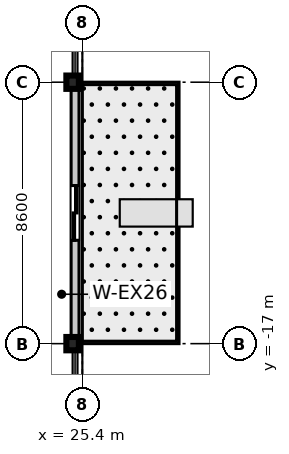
"""IFC4 building model, lengths in metres.
Left out: names, types, materials, properties, quantities, classifications, styles, units other than length and angle.
Written with IfcOpenShell. Run it as: python <this file> out.ifc"""

import sys

from ifc_helpers import new_model, si_unit, direction, frame, frame_2d, origin, origin_2d, place, context, subcontext, project, spatial, rectangle, i_section, extrude, source, transform, mapped, element, fill, save


model = new_model("IFC4")
c1 = context("Model", 3, precision=1e-05, world=origin(), true_north=direction((0.0, 1.0)))
c2 = subcontext(c1, "Body", "Model", "MODEL_VIEW")
j1 = project(units=[si_unit("LENGTHUNIT", "METRE"), si_unit("PLANEANGLEUNIT", "RADIAN")], contexts=[c1])
p1 = place(None, origin())
s1 = spatial("IfcSite", under=j1, at=p1, CompositionType="ELEMENT")
p2 = place(p1, origin())
s2 = spatial("IfcBuilding", under=s1, at=p2, CompositionType="ELEMENT")
p3 = place(p2, frame((0.0, 0.0, 68.9)))
s3 = spatial("IfcBuildingStorey", under=s2, at=p3, CompositionType="ELEMENT", Elevation=68.9)
m1 = source(origin(), c2, "Body", "SweptSolid", [
    extrude(i_section(OverallWidth=0.412, OverallDepth=0.438, WebThickness=0.023, FlangeThickness=0.036, at=origin_2d()), origin(), (0.0, 0.0, 1.0), 3.605),
])
for number, where, z_axis, x_axis in (
    (1, (25.08, -17.0, 0.0), (0.0, 0.0, 1.0), (1.0, 0.0, 0.0)),
    (2, (25.08, -8.4, 0.0), (0.0, 0.0, 1.0), (1.0, 0.0, 0.0)),
):
    element("IfcColumn", number, at=place(p3, frame(where, z_axis=z_axis, x_axis=x_axis)), inside=s3, PredefinedType="COLUMN", context=c2, shape_type="MappedRepresentation", body=[
        mapped(m1, transform((0.0, 0.0, 0.0), scale=1.0)),
    ])
m2 = source(origin(), c2, "Body", "SweptSolid", [
    extrude(rectangle(XDim=8.6, YDim=0.26, at=frame_2d((4.3, 0.0))), origin(), (0.0, 0.0, 1.0), 2.85),
])
p4 = place(p3, frame((25.16, -17.0, 0.0), z_axis=(0.0, 0.0, 1.0), x_axis=(0.0, 1.0, 0.0)))
e3 = element("IfcWall", 3, at=p4, inside=s3, PredefinedType="STANDARD", context=c2, shape_type="MappedRepresentation", body=[
    mapped(m2, transform((0.0, 0.0, 0.0), scale=1.0)),
])
p5 = place(p4, frame((3.4, 0.0, 0.0)))
e4 = element("IfcOpeningElement", 4, at=p5, cuts=e3, PredefinedType="OPENING", context=c2, shape_type="SweptSolid", body=[
    extrude(rectangle(XDim=1.8, YDim=2.25, at=frame_2d((0.9, 1.125))), frame((0.0, 0.14, 0.0), z_axis=(0.0, -1.0, 0.0), x_axis=(1.0, 0.0, 0.0)), (0.0, 0.0, 1.0), 0.28),
])
m3 = source(origin(), c2, "Body", "SweptSolid", [
    extrude(rectangle(XDim=1.8, YDim=2.25, at=frame_2d((0.9, 1.125))), frame((0.0, 0.025, 0.0), z_axis=(0.0, -1.0, 0.0), x_axis=(1.0, 0.0, 0.0)), (0.0, 0.0, 1.0), 0.05),
])
p6 = place(p5, frame((1.8, 0.0, 0.0), z_axis=(0.0, 0.0, 1.0), x_axis=(-1.0, 0.0, 0.0)))
e5 = element("IfcDoor", 5, at=p6, inside=s3, OperationType="DOUBLE_DOOR_SLIDING", PredefinedType="DOOR", context=c2, shape_type="MappedRepresentation", body=[
    mapped(m3, transform((0.0, 0.0, 0.0), scale=1.0)),
])
fill(e4, e5)
save(model, sys.argv[1])
